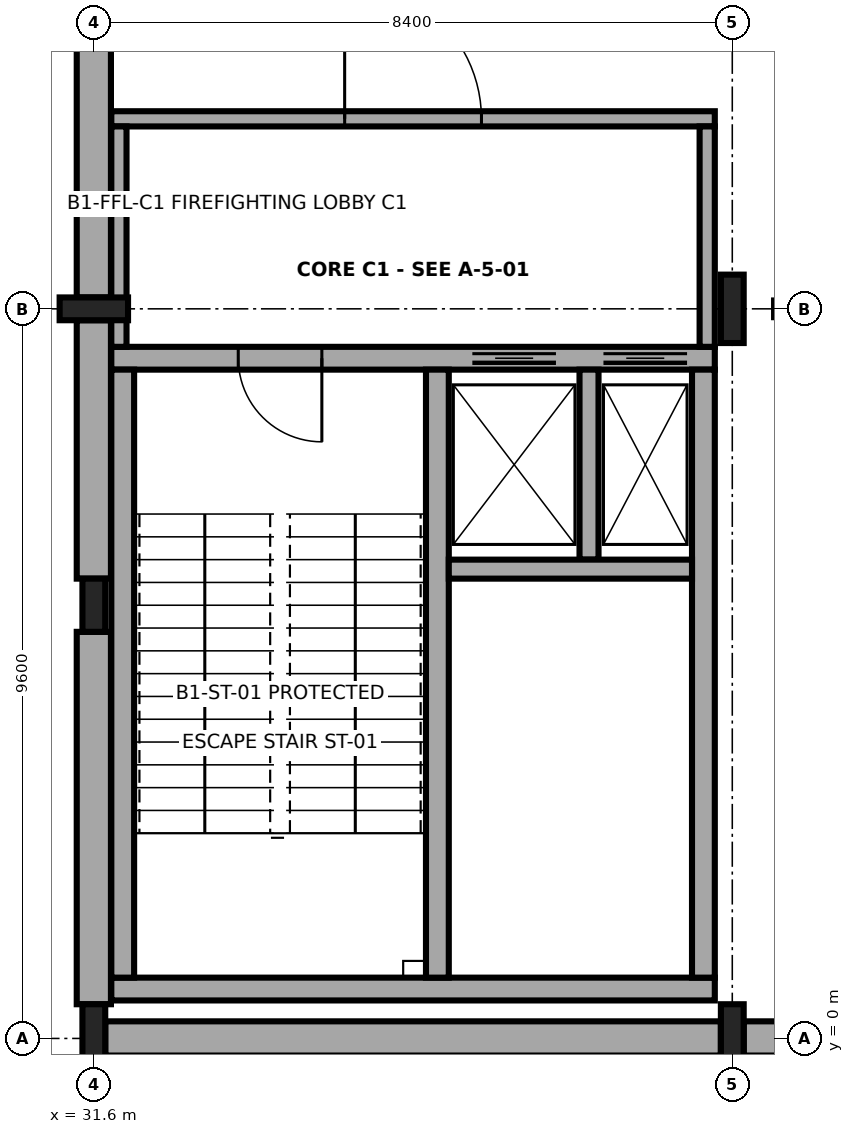
"""IFC4 building model, lengths in metres.
Left out: names, types, materials, properties, quantities, classifications, styles, units other than length and angle.
Written with IfcOpenShell. Run it as: python <this file> out.ifc"""

import sys

from ifc_helpers import new_model, si_unit, direction, frame, frame_2d, origin, origin_2d, place, context, subcontext, project, spatial, rectangle, i_section, extrude, element, fill, save


model = new_model("IFC4")
c1 = context("Model", 3, precision=1e-05, world=origin(), true_north=direction((0.0, 1.0)))
c2 = subcontext(c1, "Body", "Model", "MODEL_VIEW")
j1 = project(units=[si_unit("LENGTHUNIT", "METRE"), si_unit("PLANEANGLEUNIT", "RADIAN")], contexts=[c1])
p1 = place(None, origin())
s1 = spatial("IfcSite", under=j1, at=p1, CompositionType="ELEMENT")
p2 = place(p1, origin())
s2 = spatial("IfcBuilding", under=s1, at=p2, CompositionType="ELEMENT")
p3 = place(p2, frame((0.0, 0.0, -4.8)))
s3 = spatial("IfcBuildingStorey", under=s2, at=p3, CompositionType="ELEMENT", Elevation=-4.8)
for number, where, z_axis, x_axis in (
    (1, (31.6, 0.0, 0.0), (0.0, 0.0, 1.0), (1.0, 0.0, 0.0)),
    (2, (31.6, 9.6, 0.0), (0.0, 0.0, 1.0), (0.0, 1.0, 0.0)),
    (3, (40.0, 0.0, 0.0), (0.0, 0.0, 1.0), (1.0, 0.0, 0.0)),
    (4, (40.0, 9.6, 0.0), (0.0, 0.0, 1.0), (1.0, 0.0, 0.0)),
):
    element("IfcColumn", number, at=place(p3, frame(where, z_axis=z_axis, x_axis=x_axis)), inside=s3, PredefinedType="COLUMN", context=c2, shape_type="SweptSolid", body=[
        extrude(i_section(OverallWidth=0.3, OverallDepth=0.9, WebThickness=0.019, FlangeThickness=0.035, FilletRadius=0.03, at=origin_2d()), origin(), (0.0, 0.0, 1.0), 4.8),
    ])
p4 = place(p3, frame((31.6, 5.7, 0.0), z_axis=(0.0, 0.0, 1.0), x_axis=(1.0, 0.0, 0.0)))
e5 = element("IfcColumn", 5, at=p4, inside=s3, PredefinedType="COLUMN", context=c2, shape_type="SweptSolid", body=[
    extrude(i_section(OverallWidth=0.3, OverallDepth=0.7, WebThickness=0.017, FlangeThickness=0.032, FilletRadius=0.027, at=origin_2d()), origin(), (0.0, 0.0, 1.0), 4.8),
])
for number, where, z_axis, x_axis in (
    (6, (48.25, 0.0, 0.0), (0.0, 0.0, 1.0), (-1.0, 0.0, 0.0)),
    (7, (39.85, 0.0, 0.0), (0.0, 0.0, 1.0), (-1.0, 0.0, 0.0)),
):
    element("IfcWall", number, at=place(p3, frame(where, z_axis=z_axis, x_axis=x_axis)), inside=s3, PredefinedType="USERDEFINED", context=c2, shape_type="SweptSolid", body=[
        extrude(rectangle(XDim=8.1, YDim=0.45, at=frame_2d((4.05, 0.0))), origin(), (0.0, 0.0, 1.0), 4.48),
    ])
p5 = place(p3, frame((31.6, 0.45, 0.0), z_axis=(0.0, 0.0, 1.0), x_axis=(0.0, 1.0, 0.0)))
e8 = element("IfcWall", 8, at=p5, inside=s3, PredefinedType="USERDEFINED", context=c2, shape_type="SweptSolid", body=[
    extrude(rectangle(XDim=4.9, YDim=0.45, at=frame_2d((2.45, 0.0))), origin(), (0.0, 0.0, 1.0), 4.48),
])
p6 = place(p3, frame((31.6, 6.05, 0.0), z_axis=(0.0, 0.0, 1.0), x_axis=(0.0, 1.0, 0.0)))
e9 = element("IfcWall", 9, at=p6, inside=s3, PredefinedType="USERDEFINED", context=c2, shape_type="SweptSolid", body=[
    extrude(rectangle(XDim=3.4, YDim=0.45, at=frame_2d((1.7, 0.0))), origin(), (0.0, 0.0, 1.0), 4.48),
])
p7 = place(p3, frame((31.6, 9.75, 0.0), z_axis=(0.0, 0.0, 1.0), x_axis=(0.0, 1.0, 0.0)))
e10 = element("IfcWall", 10, at=p7, inside=s3, PredefinedType="USERDEFINED", context=c2, shape_type="SweptSolid", body=[
    extrude(rectangle(XDim=9.0, YDim=0.45, at=frame_2d((4.5, 0.0))), origin(), (0.0, 0.0, 1.0), 4.48),
])
p8 = place(p3, frame((31.83, 0.65, 0.0), z_axis=(0.0, 0.0, 1.0), x_axis=(1.0, 0.0, 0.0)))
e11 = element("IfcWall", 11, at=p8, inside=s3, PredefinedType="SHEAR", context=c2, shape_type="SweptSolid", body=[
    extrude(rectangle(XDim=7.94, YDim=0.3, at=frame_2d((3.97, 0.0))), origin(), (0.0, 0.0, 1.0), 4.5),
])
p9 = place(p3, frame((39.77, 8.95, 0.0), z_axis=(0.0, 0.0, 1.0), x_axis=(-1.0, 0.0, 0.0)))
e12 = element("IfcWall", 12, at=p9, inside=s3, PredefinedType="SHEAR", context=c2, shape_type="SweptSolid", body=[
    extrude(rectangle(XDim=7.94, YDim=0.3, at=frame_2d((3.97, 0.0))), origin(), (0.0, 0.0, 1.0), 4.5),
])
p10 = place(p9, frame((5.17, 0.0, 0.0)))
e13 = element("IfcOpeningElement", 13, at=p10, cuts=e12, PredefinedType="OPENING", context=c2, shape_type="SweptSolid", body=[
    extrude(rectangle(XDim=1.1, YDim=2.2, at=frame_2d((0.55, 1.1))), frame((0.0, 0.16, 0.0), z_axis=(0.0, -1.0, 0.0), x_axis=(1.0, 0.0, 0.0)), (0.0, 0.0, 1.0), 0.32),
])
p11 = place(p9, frame((2.09, 0.0, 0.0)))
e14 = element("IfcOpeningElement", 14, at=p11, cuts=e12, PredefinedType="OPENING", context=c2, shape_type="SweptSolid", body=[
    extrude(rectangle(XDim=1.1, YDim=2.1, at=frame_2d((0.55, 1.05))), frame((0.0, 0.16, 0.0), z_axis=(0.0, -1.0, 0.0), x_axis=(1.0, 0.0, 0.0)), (0.0, 0.0, 1.0), 0.32),
])
p12 = place(p9, frame((0.365, 0.0, 0.0)))
e15 = element("IfcOpeningElement", 15, at=p12, cuts=e12, PredefinedType="OPENING", context=c2, shape_type="SweptSolid", body=[
    extrude(rectangle(XDim=1.1, YDim=2.1, at=frame_2d((0.55, 1.05))), frame((0.0, 0.16, 0.0), z_axis=(0.0, -1.0, 0.0), x_axis=(1.0, 0.0, 0.0)), (0.0, 0.0, 1.0), 0.32),
])
for number, where, z_axis, x_axis in (
    (16, (31.98, 8.8, 0.0), (0.0, 0.0, 1.0), (0.0, -1.0, 0.0)),
    (17, (39.62, 0.8, 0.0), (0.0, 0.0, 1.0), (0.0, 1.0, 0.0)),
    (18, (36.12, 0.8, 0.0), (0.0, 0.0, 1.0), (0.0, 1.0, 0.0)),
):
    element("IfcWall", number, at=place(p3, frame(where, z_axis=z_axis, x_axis=x_axis)), inside=s3, PredefinedType="SHEAR", context=c2, shape_type="SweptSolid", body=[
        extrude(rectangle(XDim=8.0, YDim=0.3, at=frame_2d((4.0, 0.0))), origin(), (0.0, 0.0, 1.0), 4.5),
    ])
p13 = place(p3, frame((38.115, 6.3, 0.0), z_axis=(0.0, 0.0, 1.0), x_axis=(0.0, 1.0, 0.0)))
e19 = element("IfcWall", 19, at=p13, inside=s3, PredefinedType="SHEAR", context=c2, shape_type="SweptSolid", body=[
    extrude(rectangle(XDim=2.5, YDim=0.25, at=frame_2d((1.25, 0.0))), origin(), (0.0, 0.0, 1.0), 4.5),
])
p14 = place(p3, frame((36.27, 6.175, 0.0), z_axis=(0.0, 0.0, 1.0), x_axis=(1.0, 0.0, 0.0)))
e20 = element("IfcWall", 20, at=p14, inside=s3, PredefinedType="SHEAR", context=c2, shape_type="SweptSolid", body=[
    extrude(rectangle(XDim=3.2, YDim=0.25, at=frame_2d((1.6, 0.0))), origin(), (0.0, 0.0, 1.0), 4.5),
])
p15 = place(p3, frame((31.83, 12.1, 0.0), z_axis=(0.0, 0.0, 1.0), x_axis=(1.0, 0.0, 0.0)))
e21 = element("IfcWall", 21, at=p15, inside=s3, PredefinedType="SOLIDWALL", context=c2, shape_type="SweptSolid", body=[
    extrude(rectangle(XDim=7.94, YDim=0.2, at=frame_2d((3.97, 0.0))), origin(), (0.0, 0.0, 1.0), 4.132),
])
p16 = place(p15, frame((3.07, 0.0, 0.0)))
e22 = element("IfcOpeningElement", 22, at=p16, cuts=e21, PredefinedType="OPENING", context=c2, shape_type="SweptSolid", body=[
    extrude(rectangle(XDim=1.8, YDim=2.2, at=frame_2d((0.9, 1.1))), frame((0.0, 0.11, 0.0), z_axis=(0.0, -1.0, 0.0), x_axis=(1.0, 0.0, 0.0)), (0.0, 0.0, 1.0), 0.22),
])
for number, where, z_axis, x_axis in (
    (23, (31.93, 9.1, 0.0), (0.0, 0.0, 1.0), (0.0, 1.0, 0.0)),
    (24, (39.67, 12.0, 0.0), (0.0, 0.0, 1.0), (0.0, -1.0, 0.0)),
):
    element("IfcWall", number, at=place(p3, frame(where, z_axis=z_axis, x_axis=x_axis)), inside=s3, PredefinedType="SOLIDWALL", context=c2, shape_type="SweptSolid", body=[
        extrude(rectangle(XDim=2.9, YDim=0.2, at=frame_2d((1.45, 0.0))), origin(), (0.0, 0.0, 1.0), 3.832),
    ])
p17 = place(p3, frame((40.55, 9.6, 0.0), z_axis=(0.0, 0.0, 1.0), x_axis=(1.0, 0.0, 0.0)))
e25 = element("IfcWall", 25, at=p17, inside=s3, PredefinedType="PARTITIONING", context=c2, shape_type="SweptSolid", body=[
    extrude(rectangle(XDim=7.3, YDim=0.22, at=frame_2d((3.65, 0.0))), origin(), (0.0, 0.0, 1.0), 3.832),
])
p18 = place(p17, frame((2.45, 0.0, 0.0)))
e26 = element("IfcOpeningElement", 26, at=p18, cuts=e25, PredefinedType="OPENING", context=c2, shape_type="SweptSolid", body=[
    extrude(rectangle(XDim=2.4, YDim=2.6, at=frame_2d((1.2, 1.3))), frame((0.0, 0.12, 0.0), z_axis=(0.0, -1.0, 0.0), x_axis=(1.0, 0.0, 0.0)), (0.0, 0.0, 1.0), 0.24),
])
p19 = place(p10, origin())
e27 = element("IfcDoor", 27, at=p19, inside=s3, OperationType="SINGLE_SWING_LEFT", PredefinedType="DOOR", context=c2, shape_type="SweptSolid", body=[
    extrude(rectangle(XDim=1.1, YDim=2.2, at=frame_2d((0.55, 1.1))), frame((0.0, 0.025, 0.0), z_axis=(0.0, -1.0, 0.0), x_axis=(1.0, 0.0, 0.0)), (0.0, 0.0, 1.0), 0.05),
])
fill(e13, e27)
p20 = place(p11, origin())
e28 = element("IfcDoor", 28, at=p20, inside=s3, OperationType="SLIDING_TO_LEFT", PredefinedType="DOOR", context=c2, shape_type="SweptSolid", body=[
    extrude(rectangle(XDim=1.1, YDim=2.1, at=frame_2d((0.55, 1.05))), frame((0.0, 0.025, 0.0), z_axis=(0.0, -1.0, 0.0), x_axis=(1.0, 0.0, 0.0)), (0.0, 0.0, 1.0), 0.05),
])
fill(e14, e28)
p21 = place(p12, origin())
e29 = element("IfcDoor", 29, at=p21, inside=s3, OperationType="SLIDING_TO_LEFT", PredefinedType="DOOR", context=c2, shape_type="SweptSolid", body=[
    extrude(rectangle(XDim=1.1, YDim=2.1, at=frame_2d((0.55, 1.05))), frame((0.0, 0.025, 0.0), z_axis=(0.0, -1.0, 0.0), x_axis=(1.0, 0.0, 0.0)), (0.0, 0.0, 1.0), 0.05),
])
fill(e15, e29)
p22 = place(p16, origin())
e30 = element("IfcDoor", 30, at=p22, inside=s3, OperationType="DOUBLE_DOOR_SINGLE_SWING", PredefinedType="DOOR", context=c2, shape_type="SweptSolid", body=[
    extrude(rectangle(XDim=1.8, YDim=2.2, at=frame_2d((0.9, 1.1))), frame((0.0, 0.025, 0.0), z_axis=(0.0, -1.0, 0.0), x_axis=(1.0, 0.0, 0.0)), (0.0, 0.0, 1.0), 0.05),
])
fill(e22, e30)
save(model, sys.argv[1])
